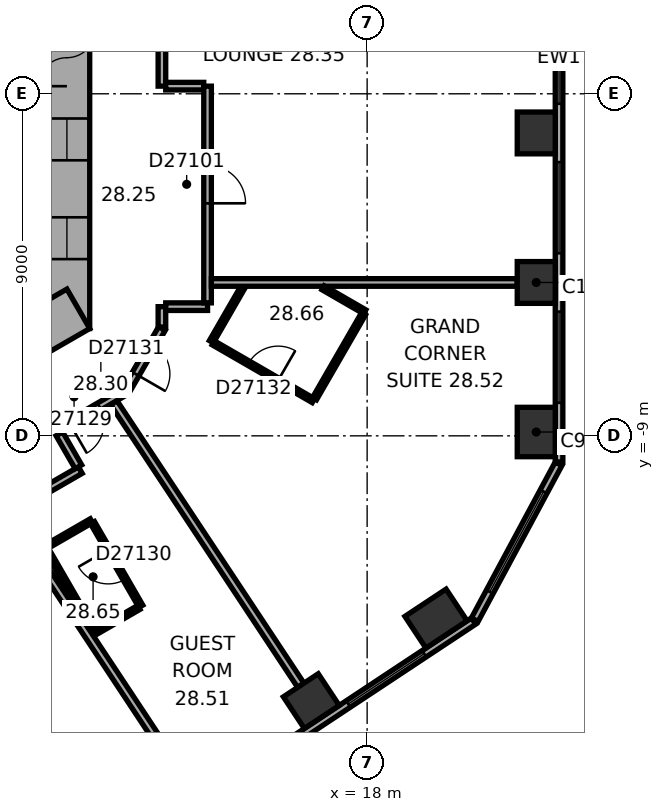
"""IFC4 building model, lengths in metres.
Left out: names, types, materials, properties, quantities, classifications, styles, units other than length and angle.
Written with IfcOpenShell. Run it as: python <this file> out.ifc"""

import sys

from ifc_helpers import new_model, si_unit, direction, frame, frame_2d, origin, origin_2d, place, context, subcontext, project, spatial, rectangle, extrude, element, fill, save


model = new_model("IFC4")
c1 = context("Model", 3, precision=1e-05, world=origin(), true_north=direction((0.0, 1.0)))
c2 = subcontext(c1, "Body", "Model", "MODEL_VIEW")
j1 = project(units=[si_unit("LENGTHUNIT", "METRE"), si_unit("PLANEANGLEUNIT", "RADIAN")], contexts=[c1])
p1 = place(None, origin())
s1 = spatial("IfcSite", under=j1, at=p1, CompositionType="ELEMENT")
p2 = place(p1, origin())
s2 = spatial("IfcBuilding", under=s1, at=p2, CompositionType="ELEMENT")
p3 = place(p2, frame((0.0, 0.0, 116.6)))
s3 = spatial("IfcBuildingStorey", under=s2, at=p3, CompositionType="ELEMENT", Elevation=116.6)
p4 = place(p3, frame((22.45, -8.899, 0.0), z_axis=(0.0, 0.0, 1.0), x_axis=(0.0, 1.0, 0.0)))
e1 = element("IfcColumn", 1, at=p4, inside=s3, PredefinedType="COLUMN", context=c2, shape_type="SweptSolid", body=[
    extrude(rectangle(XDim=1.3, YDim=1.0, at=origin_2d()), origin(), (0.0, 0.0, 1.0), 3.3),
])
for number, where, z_axis, x_axis in (
    (2, (22.45, -4.965, 0.0), (0.0, 0.0, 1.0), (0.0, 1.0, 0.0)),
    (3, (22.45, -1.03, 0.0), (0.0, 0.0, 1.0), (0.0, 1.0, 0.0)),
    (4, (16.531, -15.981, 0.0), (0.0, 0.0, 1.0), (0.834, 0.552, 0.0)),
):
    element("IfcColumn", number, at=place(p3, frame(where, z_axis=z_axis, x_axis=x_axis)), inside=s3, PredefinedType="COLUMN", context=c2, shape_type="SweptSolid", body=[
        extrude(rectangle(XDim=1.1, YDim=1.0, at=origin_2d()), origin(), (0.0, 0.0, 1.0), 3.3),
    ])
p5 = place(p3, frame((19.812, -13.809, 0.0), z_axis=(0.0, 0.0, 1.0), x_axis=(0.833885822067, 0.551936985312, 0.0)))
e5 = element("IfcColumn", 5, at=p5, inside=s3, PredefinedType="COLUMN", context=c2, shape_type="SweptSolid", body=[
    extrude(rectangle(XDim=1.3, YDim=1.0, at=origin_2d()), origin(), (0.0, 0.0, 1.0), 3.3),
])
p6 = place(p3, frame((10.1, -6.177, 0.0), z_axis=(0.0, 0.0, 1.0), x_axis=(0.0, 1.0, 0.0)))
e6 = element("IfcWall", 6, at=p6, inside=s3, PredefinedType="SHEAR", context=c2, shape_type="SweptSolid", body=[
    extrude(rectangle(XDim=12.355, YDim=1.2, at=frame_2d((6.177, 0.0))), origin(), (0.0, 0.0, 1.0), 3.3),
])
p7 = place(p6, frame((6.378, 0.0, 0.0)))
e7 = element("IfcOpeningElement", 7, at=p7, cuts=e6, PredefinedType="OPENING", context=c2, shape_type="SweptSolid", body=[
    extrude(rectangle(XDim=1.5, YDim=2.1, at=frame_2d((0.75, 1.05))), frame((0.0, 0.61, 0.0), z_axis=(0.0, -1.0, 0.0), x_axis=(1.0, 0.0, 0.0)), (0.0, 0.0, 1.0), 1.22),
])
p8 = place(p6, frame((1.828, 0.0, 0.0)))
e8 = element("IfcOpeningElement", 8, at=p8, cuts=e6, PredefinedType="OPENING", context=c2, shape_type="SweptSolid", body=[
    extrude(rectangle(XDim=1.1, YDim=2.1, at=frame_2d((0.55, 1.05))), frame((0.0, 0.61, 0.0), z_axis=(0.0, -1.0, 0.0), x_axis=(1.0, 0.0, 0.0)), (0.0, 0.0, 1.0), 1.22),
])
p9 = place(p6, frame((4.427, 0.0, 0.0)))
e9 = element("IfcOpeningElement", 9, at=p9, cuts=e6, PredefinedType="OPENING", context=c2, shape_type="SweptSolid", body=[
    extrude(rectangle(XDim=1.1, YDim=2.1, at=frame_2d((0.55, 1.05))), frame((0.0, 0.61, 0.0), z_axis=(0.0, -1.0, 0.0), x_axis=(1.0, 0.0, 0.0)), (0.0, 0.0, 1.0), 1.22),
])
p10 = place(p3, frame((-0.3, -11.836, 0.0), z_axis=(0.0, 0.0, 1.0), x_axis=(0.866021384402, 0.500006961711, 0.0)))
e10 = element("IfcWall", 10, at=p10, inside=s3, PredefinedType="SHEAR", context=c2, shape_type="SweptSolid", body=[
    extrude(rectangle(XDim=12.355, YDim=1.2, at=frame_2d((6.178, 0.0))), origin(), (0.0, 0.0, 1.0), 3.3),
])
p11 = place(p10, frame((4.128, 0.0, 0.0)))
e11 = element("IfcOpeningElement", 11, at=p11, cuts=e10, PredefinedType="OPENING", context=c2, shape_type="SweptSolid", body=[
    extrude(rectangle(XDim=0.9, YDim=2.1, at=frame_2d((0.45, 1.05))), frame((0.0, 0.61, 0.0), z_axis=(0.0, -1.0, 0.0), x_axis=(1.0, 0.0, 0.0)), (0.0, 0.0, 1.0), 1.22),
])
p12 = place(p10, frame((7.928, 0.0, 0.0)))
e12 = element("IfcOpeningElement", 12, at=p12, cuts=e10, PredefinedType="OPENING", context=c2, shape_type="SweptSolid", body=[
    extrude(rectangle(XDim=1.1, YDim=2.1, at=frame_2d((0.55, 1.05))), frame((0.0, 0.61, 0.0), z_axis=(0.0, -1.0, 0.0), x_axis=(1.0, 0.0, 0.0)), (0.0, 0.0, 1.0), 1.22),
])
p13 = place(p3, frame((23.05, -9.687, 0.0), z_axis=(0.0, 0.0, 1.0), x_axis=(0.0, 1.0, 0.0)))
e13 = element("IfcWall", 13, at=p13, inside=s3, PredefinedType="STANDARD", context=c2, shape_type="SweptSolid", body=[
    extrude(rectangle(XDim=21.246, YDim=0.2, at=frame_2d((10.623, 0.0))), origin(), (0.0, 0.0, 1.0), 3.3),
])
p14 = place(p13, frame((1.555, 0.0, 0.8)))
e14 = element("IfcOpeningElement", 14, at=p14, cuts=e13, PredefinedType="OPENING", context=c2, shape_type="SweptSolid", body=[
    extrude(rectangle(XDim=2.4, YDim=1.7, at=frame_2d((1.2, 0.85))), frame((0.0, 0.11, 0.0), z_axis=(0.0, -1.0, 0.0), x_axis=(1.0, 0.0, 0.0)), (0.0, 0.0, 1.0), 0.22),
])
p15 = place(p13, frame((5.489, 0.0, 0.8)))
e15 = element("IfcOpeningElement", 15, at=p15, cuts=e13, PredefinedType="OPENING", context=c2, shape_type="SweptSolid", body=[
    extrude(rectangle(XDim=2.4, YDim=1.7, at=frame_2d((1.2, 0.85))), frame((0.0, 0.11, 0.0), z_axis=(0.0, -1.0, 0.0), x_axis=(1.0, 0.0, 0.0)), (0.0, 0.0, 1.0), 0.22),
])
p16 = place(p13, frame((9.424, 0.0, 0.8)))
e16 = element("IfcOpeningElement", 16, at=p16, cuts=e13, PredefinedType="OPENING", context=c2, shape_type="SweptSolid", body=[
    extrude(rectangle(XDim=2.4, YDim=1.7, at=frame_2d((1.2, 0.85))), frame((0.0, 0.11, 0.0), z_axis=(0.0, -1.0, 0.0), x_axis=(1.0, 0.0, 0.0)), (0.0, 0.0, 1.0), 0.22),
])
p17 = place(p13, frame((13.358, 0.0, 0.8)))
e17 = element("IfcOpeningElement", 17, at=p17, cuts=e13, PredefinedType="OPENING", context=c2, shape_type="SweptSolid", body=[
    extrude(rectangle(XDim=2.4, YDim=1.7, at=frame_2d((1.2, 0.85))), frame((0.0, 0.11, 0.0), z_axis=(0.0, -1.0, 0.0), x_axis=(1.0, 0.0, 0.0)), (0.0, 0.0, 1.0), 0.22),
])
p18 = place(p13, frame((17.293, 0.0, 0.8)))
e18 = element("IfcOpeningElement", 18, at=p18, cuts=e13, PredefinedType="OPENING", context=c2, shape_type="SweptSolid", body=[
    extrude(rectangle(XDim=2.4, YDim=1.7, at=frame_2d((1.2, 0.85))), frame((0.0, 0.11, 0.0), z_axis=(0.0, -1.0, 0.0), x_axis=(1.0, 0.0, 0.0)), (0.0, 0.0, 1.0), 0.22),
])
p19 = place(p3, frame((3.083, -25.601, 0.0), z_axis=(0.0, 0.0, 1.0), x_axis=(0.833884295743, 0.551939291329, 0.0)))
e19 = element("IfcWall", 19, at=p19, inside=s3, PredefinedType="STANDARD", context=c2, shape_type="SweptSolid", body=[
    extrude(rectangle(XDim=21.246, YDim=0.2, at=frame_2d((10.623, 0.0))), origin(), (0.0, 0.0, 1.0), 3.3),
])
p20 = place(p19, frame((1.553, 0.0, 0.8)))
e20 = element("IfcOpeningElement", 20, at=p20, cuts=e19, PredefinedType="OPENING", context=c2, shape_type="SweptSolid", body=[
    extrude(rectangle(XDim=2.4, YDim=1.7, at=frame_2d((1.2, 0.85))), frame((0.0, 0.11, 0.0), z_axis=(0.0, -1.0, 0.0), x_axis=(1.0, 0.0, 0.0)), (0.0, 0.0, 1.0), 0.22),
])
p21 = place(p19, frame((5.488, 0.0, 0.8)))
e21 = element("IfcOpeningElement", 21, at=p21, cuts=e19, PredefinedType="OPENING", context=c2, shape_type="SweptSolid", body=[
    extrude(rectangle(XDim=2.4, YDim=1.7, at=frame_2d((1.2, 0.85))), frame((0.0, 0.11, 0.0), z_axis=(0.0, -1.0, 0.0), x_axis=(1.0, 0.0, 0.0)), (0.0, 0.0, 1.0), 0.22),
])
p22 = place(p19, frame((9.422, 0.0, 0.8)))
e22 = element("IfcOpeningElement", 22, at=p22, cuts=e19, PredefinedType="OPENING", context=c2, shape_type="SweptSolid", body=[
    extrude(rectangle(XDim=2.4, YDim=1.7, at=frame_2d((1.2, 0.85))), frame((0.0, 0.11, 0.0), z_axis=(0.0, -1.0, 0.0), x_axis=(1.0, 0.0, 0.0)), (0.0, 0.0, 1.0), 0.22),
])
p23 = place(p19, frame((13.357, 0.0, 0.8)))
e23 = element("IfcOpeningElement", 23, at=p23, cuts=e19, PredefinedType="OPENING", context=c2, shape_type="SweptSolid", body=[
    extrude(rectangle(XDim=2.4, YDim=1.7, at=frame_2d((1.2, 0.85))), frame((0.0, 0.11, 0.0), z_axis=(0.0, -1.0, 0.0), x_axis=(1.0, 0.0, 0.0)), (0.0, 0.0, 1.0), 0.22),
])
p24 = place(p19, frame((17.291, 0.0, 0.8)))
e24 = element("IfcOpeningElement", 24, at=p24, cuts=e19, PredefinedType="OPENING", context=c2, shape_type="SweptSolid", body=[
    extrude(rectangle(XDim=2.4, YDim=1.7, at=frame_2d((1.2, 0.85))), frame((0.0, 0.11, 0.0), z_axis=(0.0, -1.0, 0.0), x_axis=(1.0, 0.0, 0.0)), (0.0, 0.0, 1.0), 0.22),
])
p25 = place(p3, frame((20.833, -13.839, 0.0), z_axis=(0.0, 0.0, 1.0), x_axis=(0.473321668581, 0.880889662813, 0.0)))
e25 = element("IfcWall", 25, at=p25, inside=s3, PredefinedType="STANDARD", context=c2, shape_type="SweptSolid", body=[
    extrude(rectangle(XDim=4.66, YDim=0.2, at=frame_2d((2.33, 0.0))), origin(), (0.0, 0.0, 1.0), 3.3),
])
p26 = place(p25, frame((0.83, 0.0, 0.8)))
e26 = element("IfcOpeningElement", 26, at=p26, cuts=e25, PredefinedType="OPENING", context=c2, shape_type="SweptSolid", body=[
    extrude(rectangle(XDim=3.0, YDim=1.7, at=frame_2d((1.5, 0.85))), frame((0.0, 0.11, 0.0), z_axis=(0.0, -1.0, 0.0), x_axis=(1.0, 0.0, 0.0)), (0.0, 0.0, 1.0), 0.22),
])
p27 = place(p3, frame((7.419, -11.653, 0.0), z_axis=(0.0, 0.0, 1.0), x_axis=(0.866038154057, 0.49997791523, 0.0)))
e27 = element("IfcWall", 27, at=p27, inside=s3, PredefinedType="PARTITIONING", context=c2, shape_type="SweptSolid", body=[
    extrude(rectangle(XDim=3.502, YDim=0.2, at=frame_2d((1.751, 0.0))), origin(), (0.0, 0.0, 1.0), 2.95),
])
p28 = place(p3, frame((9.532, -11.934, 0.0), z_axis=(0.0, 0.0, 1.0), x_axis=(0.866034573852, 0.49998411664, 0.0)))
e28 = element("IfcWall", 28, at=p28, inside=s3, PredefinedType="PARTITIONING", context=c2, shape_type="SweptSolid", body=[
    extrude(rectangle(XDim=1.4, YDim=0.12, at=frame_2d((0.7, 0.0))), origin(), (0.0, 0.0, 1.0), 2.95),
])
p29 = place(p3, frame((9.693, -19.907, 0.0), z_axis=(0.0, 0.0, 1.0), x_axis=(-0.551938394837, 0.833884889121, 0.0)))
e29 = element("IfcWall", 29, at=p29, inside=s3, PredefinedType="PARTITIONING", context=c2, shape_type="SweptSolid", body=[
    extrude(rectangle(XDim=9.394, YDim=0.2, at=frame_2d((4.697, 0.0))), origin(), (0.0, 0.0, 1.0), 2.15),
])
p30 = place(p3, frame((9.852, -8.861, 0.0), z_axis=(0.0, 0.0, 1.0), x_axis=(0.866013291437, 0.500020978615, 0.0)))
e30 = element("IfcWall", 30, at=p30, inside=s3, PredefinedType="PARTITIONING", context=c2, shape_type="SweptSolid", body=[
    extrude(rectangle(XDim=2.077, YDim=0.2, at=frame_2d((1.038, 0.0))), origin(), (0.0, 0.0, 1.0), 2.95),
])
p31 = place(p30, frame((0.372, 0.0, 0.0)))
e31 = element("IfcOpeningElement", 31, at=p31, cuts=e30, PredefinedType="OPENING", context=c2, shape_type="SweptSolid", body=[
    extrude(rectangle(XDim=0.9, YDim=2.1, at=frame_2d((0.45, 1.05))), frame((0.0, 0.11, 0.0), z_axis=(0.0, -1.0, 0.0), x_axis=(1.0, 0.0, 0.0)), (0.0, 0.0, 1.0), 0.22),
])
p32 = place(p3, frame((10.402, -9.815, 0.0), z_axis=(0.0, 0.0, 1.0), x_axis=(-0.499968756647, 0.866043441391, 0.0)))
e32 = element("IfcWall", 32, at=p32, inside=s3, PredefinedType="PARTITIONING", context=c2, shape_type="SweptSolid", body=[
    extrude(rectangle(XDim=1.001, YDim=0.2, at=frame_2d((0.5, 0.0))), origin(), (0.0, 0.0, 1.0), 2.95),
])
p33 = place(p3, frame((10.775, -11.286, 0.0), z_axis=(0.0, 0.0, 1.0), x_axis=(0.500046963369, -0.865998287773, 0.0)))
e33 = element("IfcWall", 33, at=p33, inside=s3, PredefinedType="PARTITIONING", context=c2, shape_type="SweptSolid", body=[
    extrude(rectangle(XDim=2.54, YDim=0.12, at=frame_2d((1.27, 0.0))), origin(), (0.0, 0.0, 1.0), 2.95),
])
p34 = place(p33, frame((0.82, 0.0, 0.0)))
e34 = element("IfcOpeningElement", 34, at=p34, cuts=e33, PredefinedType="OPENING", context=c2, shape_type="SweptSolid", body=[
    extrude(rectangle(XDim=0.9, YDim=2.1, at=frame_2d((0.45, 1.05))), frame((0.0, 0.07, 0.0), z_axis=(0.0, -1.0, 0.0), x_axis=(1.0, 0.0, 0.0)), (0.0, 0.0, 1.0), 0.14),
])
p35 = place(p3, frame((10.833, -14.185, 0.0), z_axis=(0.0, 0.0, 1.0), x_axis=(-0.500005339912, 0.866022320763, 0.0)))
e35 = element("IfcWall", 35, at=p35, inside=s3, PredefinedType="PARTITIONING", context=c2, shape_type="SweptSolid", body=[
    extrude(rectangle(XDim=2.54, YDim=0.12, at=frame_2d((1.27, 0.0))), origin(), (0.0, 0.0, 1.0), 2.95),
])
p36 = place(p3, frame((11.67, -7.788, 0.0), z_axis=(0.0, 0.0, 1.0), x_axis=(0.500063286585, 0.865988862174, 0.0)))
e36 = element("IfcWall", 36, at=p36, inside=s3, PredefinedType="PARTITIONING", context=c2, shape_type="SweptSolid", body=[
    extrude(rectangle(XDim=1.86, YDim=0.2, at=frame_2d((0.93, 0.0))), origin(), (0.0, 0.0, 1.0), 2.95),
])
p37 = place(p36, frame((0.48, 0.0, 0.0)))
e37 = element("IfcOpeningElement", 37, at=p37, cuts=e36, PredefinedType="OPENING", context=c2, shape_type="SweptSolid", body=[
    extrude(rectangle(XDim=0.9, YDim=2.1, at=frame_2d((0.45, 1.05))), frame((0.0, 0.11, 0.0), z_axis=(0.0, -1.0, 0.0), x_axis=(1.0, 0.0, 0.0)), (0.0, 0.0, 1.0), 0.22),
])
p38 = place(p3, frame((11.993, -13.515, 0.0), z_axis=(0.0, 0.0, 1.0), x_axis=(-0.865956862152, -0.500118698802, 0.0)))
e38 = element("IfcWall", 38, at=p38, inside=s3, PredefinedType="PARTITIONING", context=c2, shape_type="SweptSolid", body=[
    extrude(rectangle(XDim=1.28, YDim=0.12, at=frame_2d((0.64, 0.0))), origin(), (0.0, 0.0, 1.0), 2.95),
])
p39 = place(p3, frame((12.6, -6.138, 0.0), z_axis=(0.0, 0.0, 1.0), x_axis=(0.0, 1.0, 0.0)))
e39 = element("IfcWall", 39, at=p39, inside=s3, PredefinedType="PARTITIONING", context=c2, shape_type="SweptSolid", body=[
    extrude(rectangle(XDim=0.537, YDim=0.2, at=frame_2d((0.268, 0.0))), origin(), (0.0, 0.0, 1.0), 2.95),
])
p40 = place(p3, frame((12.6, 0.201, 0.0), z_axis=(0.0, 0.0, 1.0), x_axis=(0.0, 1.0, 0.0)))
e40 = element("IfcWall", 40, at=p40, inside=s3, PredefinedType="PARTITIONING", context=c2, shape_type="SweptSolid", body=[
    extrude(rectangle(XDim=2.604, YDim=0.2, at=frame_2d((1.302, 0.0))), origin(), (0.0, 0.0, 1.0), 2.95),
])
p41 = place(p3, frame((12.7, -5.601, 0.0), z_axis=(0.0, 0.0, 1.0), x_axis=(1.0, 0.0, 0.0)))
e41 = element("IfcWall", 41, at=p41, inside=s3, PredefinedType="PARTITIONING", context=c2, shape_type="SweptSolid", body=[
    extrude(rectangle(XDim=1.101, YDim=0.2, at=frame_2d((0.551, 0.0))), origin(), (0.0, 0.0, 1.0), 2.95),
])
p42 = place(p3, frame((12.974, -17.735, 0.0), z_axis=(0.0, 0.0, 1.0), x_axis=(-0.55192625685, 0.833892922982, 0.0)))
e42 = element("IfcWall", 42, at=p42, inside=s3, PredefinedType="PARTITIONING", context=c2, shape_type="SweptSolid", body=[
    extrude(rectangle(XDim=7.95, YDim=0.2, at=frame_2d((3.975, 0.0))), origin(), (0.0, 0.0, 1.0), 2.95),
])
p43 = place(p3, frame((13.701, 0.201, 0.0), z_axis=(0.0, 0.0, 1.0), x_axis=(-1.0, 0.0, 0.0)))
e43 = element("IfcWall", 43, at=p43, inside=s3, PredefinedType="PARTITIONING", context=c2, shape_type="SweptSolid", body=[
    extrude(rectangle(XDim=1.001, YDim=0.2, at=frame_2d((0.5, 0.0))), origin(), (0.0, 0.0, 1.0), 2.95),
])
p44 = place(p3, frame((13.801, -5.501, 0.0), z_axis=(0.0, 0.0, 1.0), x_axis=(0.0, 1.0, 0.0)))
e44 = element("IfcWall", 44, at=p44, inside=s3, PredefinedType="PARTITIONING", context=c2, shape_type="SweptSolid", body=[
    extrude(rectangle(XDim=5.702, YDim=0.2, at=frame_2d((2.851, 0.0))), origin(), (0.0, 0.0, 1.0), 2.95),
])
p45 = place(p44, frame((2.619, 0.0, 0.0)))
e45 = element("IfcOpeningElement", 45, at=p45, cuts=e44, PredefinedType="OPENING", context=c2, shape_type="SweptSolid", body=[
    extrude(rectangle(XDim=1.0, YDim=2.1, at=frame_2d((0.5, 1.05))), frame((0.0, 0.11, 0.0), z_axis=(0.0, -1.0, 0.0), x_axis=(1.0, 0.0, 0.0)), (0.0, 0.0, 1.0), 0.22),
])
p46 = place(p3, frame((13.901, -6.524, 0.0), z_axis=(0.0, 0.0, 1.0), x_axis=(0.499964162598, 0.86604609353, 0.0)))
e46 = element("IfcWall", 46, at=p46, inside=s3, PredefinedType="PARTITIONING", context=c2, shape_type="SweptSolid", body=[
    extrude(rectangle(XDim=1.661, YDim=0.12, at=frame_2d((0.831, 0.0))), origin(), (0.0, 0.0, 1.0), 2.95),
])
p47 = place(p3, frame((13.901, -4.965, 0.0), z_axis=(0.0, 0.0, 1.0), x_axis=(1.0, 0.0, 0.0)))
e47 = element("IfcWall", 47, at=p47, inside=s3, PredefinedType="PARTITIONING", context=c2, shape_type="SweptSolid", body=[
    extrude(rectangle(XDim=8.049, YDim=0.2, at=frame_2d((4.024, 0.0))), origin(), (0.0, 0.0, 1.0), 2.95),
])
p48 = place(p3, frame((16.255, -15.564, 0.0), z_axis=(0.0, 0.0, 1.0), x_axis=(-0.55192208744, 0.833895682562, 0.0)))
e48 = element("IfcWall", 48, at=p48, inside=s3, PredefinedType="PARTITIONING", context=c2, shape_type="SweptSolid", body=[
    extrude(rectangle(XDim=8.913, YDim=0.2, at=frame_2d((4.457, 0.0))), origin(), (0.0, 0.0, 1.0), 2.15),
])
p49 = place(p3, frame((16.585, -8.074, 0.0), z_axis=(0.0, 0.0, 1.0), x_axis=(-0.86601037836, 0.500026023896, 0.0)))
e49 = element("IfcWall", 49, at=p49, inside=s3, PredefinedType="PARTITIONING", context=c2, shape_type="SweptSolid", body=[
    extrude(rectangle(XDim=3.04, YDim=0.12, at=frame_2d((1.52, 0.0))), origin(), (0.0, 0.0, 1.0), 2.95),
])
p50 = place(p49, frame((1.07, 0.0, 0.0)))
e50 = element("IfcOpeningElement", 50, at=p50, cuts=e49, PredefinedType="OPENING", context=c2, shape_type="SweptSolid", body=[
    extrude(rectangle(XDim=0.9, YDim=2.1, at=frame_2d((0.45, 1.05))), frame((0.0, 0.07, 0.0), z_axis=(0.0, -1.0, 0.0), x_axis=(1.0, 0.0, 0.0)), (0.0, 0.0, 1.0), 0.14),
])
p51 = place(p3, frame((16.841, -5.104, 0.0), z_axis=(0.0, 0.0, 1.0), x_axis=(0.865998956469, -0.500045805297, 0.0)))
e51 = element("IfcWall", 51, at=p51, inside=s3, PredefinedType="PARTITIONING", context=c2, shape_type="SweptSolid", body=[
    extrude(rectangle(XDim=1.264, YDim=0.12, at=frame_2d((0.632, 0.0))), origin(), (0.0, 0.0, 1.0), 2.95),
])
p52 = place(p3, frame((17.906, -5.788, 0.0), z_axis=(0.0, 0.0, 1.0), x_axis=(-0.500047388771, -0.865998042136, 0.0)))
e52 = element("IfcWall", 52, at=p52, inside=s3, PredefinedType="PARTITIONING", context=c2, shape_type="SweptSolid", body=[
    extrude(rectangle(XDim=2.58, YDim=0.12, at=frame_2d((1.29, 0.0))), origin(), (0.0, 0.0, 1.0), 2.95),
])
p53 = place(p14, origin())
e53 = element("IfcWindow", 53, at=p53, inside=s3, PartitioningType="SINGLE_PANEL", PredefinedType="WINDOW", context=c2, shape_type="SweptSolid", body=[
    extrude(rectangle(XDim=2.4, YDim=1.7, at=frame_2d((1.2, 0.85))), frame((0.0, 0.03, 0.0), z_axis=(0.0, -1.0, 0.0), x_axis=(1.0, 0.0, 0.0)), (0.0, 0.0, 1.0), 0.06),
])
fill(e14, e53)
p54 = place(p15, origin())
e54 = element("IfcWindow", 54, at=p54, inside=s3, PartitioningType="SINGLE_PANEL", PredefinedType="WINDOW", context=c2, shape_type="SweptSolid", body=[
    extrude(rectangle(XDim=2.4, YDim=1.7, at=frame_2d((1.2, 0.85))), frame((0.0, 0.03, 0.0), z_axis=(0.0, -1.0, 0.0), x_axis=(1.0, 0.0, 0.0)), (0.0, 0.0, 1.0), 0.06),
])
fill(e15, e54)
p55 = place(p16, origin())
e55 = element("IfcWindow", 55, at=p55, inside=s3, PartitioningType="SINGLE_PANEL", PredefinedType="WINDOW", context=c2, shape_type="SweptSolid", body=[
    extrude(rectangle(XDim=2.4, YDim=1.7, at=frame_2d((1.2, 0.85))), frame((0.0, 0.03, 0.0), z_axis=(0.0, -1.0, 0.0), x_axis=(1.0, 0.0, 0.0)), (0.0, 0.0, 1.0), 0.06),
])
fill(e16, e55)
p56 = place(p24, origin())
e56 = element("IfcWindow", 56, at=p56, inside=s3, PartitioningType="SINGLE_PANEL", PredefinedType="WINDOW", context=c2, shape_type="SweptSolid", body=[
    extrude(rectangle(XDim=2.4, YDim=1.7, at=frame_2d((1.2, 0.85))), frame((0.0, 0.03, 0.0), z_axis=(0.0, -1.0, 0.0), x_axis=(1.0, 0.0, 0.0)), (0.0, 0.0, 1.0), 0.06),
])
fill(e24, e56)
p57 = place(p26, origin())
e57 = element("IfcWindow", 57, at=p57, inside=s3, PartitioningType="SINGLE_PANEL", PredefinedType="WINDOW", context=c2, shape_type="SweptSolid", body=[
    extrude(rectangle(XDim=3.0, YDim=1.7, at=frame_2d((1.5, 0.85))), frame((0.0, 0.03, 0.0), z_axis=(0.0, -1.0, 0.0), x_axis=(1.0, 0.0, 0.0)), (0.0, 0.0, 1.0), 0.06),
])
fill(e26, e57)
p58 = place(p7, origin())
e58 = element("IfcDoor", 58, at=p58, inside=s3, OperationType="DOUBLE_DOOR_SINGLE_SWING", PredefinedType="DOOR", context=c2, shape_type="SweptSolid", body=[
    extrude(rectangle(XDim=1.5, YDim=2.1, at=frame_2d((0.75, 1.05))), frame((0.0, 0.025, 0.0), z_axis=(0.0, -1.0, 0.0), x_axis=(1.0, 0.0, 0.0)), (0.0, 0.0, 1.0), 0.05),
])
fill(e7, e58)
p59 = place(p8, origin())
e59 = element("IfcDoor", 59, at=p59, inside=s3, OperationType="DOUBLE_DOOR_SLIDING", PredefinedType="DOOR", context=c2, shape_type="SweptSolid", body=[
    extrude(rectangle(XDim=1.1, YDim=2.1, at=frame_2d((0.55, 1.05))), frame((0.0, 0.025, 0.0), z_axis=(0.0, -1.0, 0.0), x_axis=(1.0, 0.0, 0.0)), (0.0, 0.0, 1.0), 0.05),
])
fill(e8, e59)
p60 = place(p9, origin())
e60 = element("IfcDoor", 60, at=p60, inside=s3, OperationType="DOUBLE_DOOR_SLIDING", PredefinedType="DOOR", context=c2, shape_type="SweptSolid", body=[
    extrude(rectangle(XDim=1.1, YDim=2.1, at=frame_2d((0.55, 1.05))), frame((0.0, 0.025, 0.0), z_axis=(0.0, -1.0, 0.0), x_axis=(1.0, 0.0, 0.0)), (0.0, 0.0, 1.0), 0.05),
])
fill(e9, e60)
p61 = place(p45, origin())
e61 = element("IfcDoor", 61, at=p61, inside=s3, OperationType="SINGLE_SWING_LEFT", PredefinedType="DOOR", context=c2, shape_type="SweptSolid", body=[
    extrude(rectangle(XDim=1.0, YDim=2.1, at=frame_2d((0.5, 1.05))), frame((0.0, 0.025, 0.0), z_axis=(0.0, -1.0, 0.0), x_axis=(1.0, 0.0, 0.0)), (0.0, 0.0, 1.0), 0.05),
])
fill(e45, e61)
p62 = place(p31, origin())
e62 = element("IfcDoor", 62, at=p62, inside=s3, OperationType="SINGLE_SWING_LEFT", PredefinedType="DOOR", context=c2, shape_type="SweptSolid", body=[
    extrude(rectangle(XDim=0.9, YDim=2.1, at=frame_2d((0.45, 1.05))), frame((0.0, 0.025, 0.0), z_axis=(0.0, -1.0, 0.0), x_axis=(1.0, 0.0, 0.0)), (0.0, 0.0, 1.0), 0.05),
])
fill(e31, e62)
p63 = place(p34, origin())
e63 = element("IfcDoor", 63, at=p63, inside=s3, OperationType="SINGLE_SWING_LEFT", PredefinedType="DOOR", context=c2, shape_type="SweptSolid", body=[
    extrude(rectangle(XDim=0.9, YDim=2.1, at=frame_2d((0.45, 1.05))), frame((0.0, 0.025, 0.0), z_axis=(0.0, -1.0, 0.0), x_axis=(1.0, 0.0, 0.0)), (0.0, 0.0, 1.0), 0.05),
])
fill(e34, e63)
p64 = place(p37, origin())
e64 = element("IfcDoor", 64, at=p64, inside=s3, OperationType="SINGLE_SWING_LEFT", PredefinedType="DOOR", context=c2, shape_type="SweptSolid", body=[
    extrude(rectangle(XDim=0.9, YDim=2.1, at=frame_2d((0.45, 1.05))), frame((0.0, 0.025, 0.0), z_axis=(0.0, -1.0, 0.0), x_axis=(1.0, 0.0, 0.0)), (0.0, 0.0, 1.0), 0.05),
])
fill(e37, e64)
p65 = place(p50, origin())
e65 = element("IfcDoor", 65, at=p65, inside=s3, OperationType="SINGLE_SWING_LEFT", PredefinedType="DOOR", context=c2, shape_type="SweptSolid", body=[
    extrude(rectangle(XDim=0.9, YDim=2.1, at=frame_2d((0.45, 1.05))), frame((0.0, 0.025, 0.0), z_axis=(0.0, -1.0, 0.0), x_axis=(1.0, 0.0, 0.0)), (0.0, 0.0, 1.0), 0.05),
])
fill(e50, e65)
save(model, sys.argv[1])
